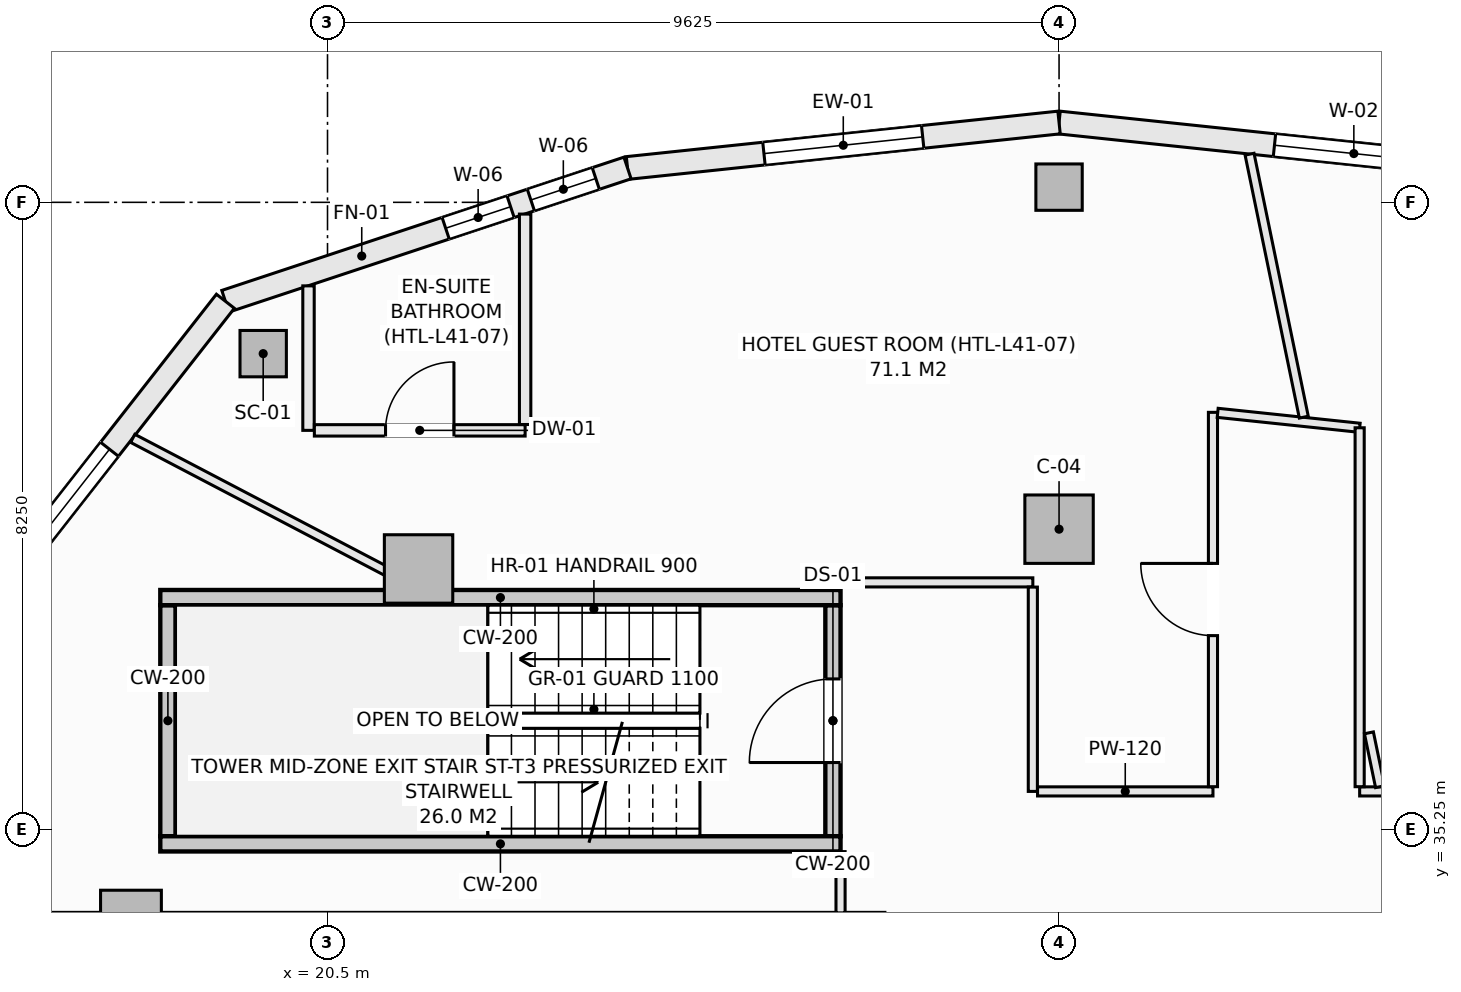
"""IFC4 building model, lengths in metres.
Left out: names, types, materials, properties, quantities, classifications, styles, units other than length and angle.
Written with IfcOpenShell. Run it as: python <this file> out.ifc"""

import sys

from ifc_helpers import new_model, si_unit, direction, frame, frame_2d, origin, origin_2d, place, context, subcontext, project, spatial, rectangle, hollow_rectangle, extrude, element, fill, save


model = new_model("IFC4")
c1 = context("Model", 3, precision=1e-05, world=origin(), true_north=direction((0.0, 1.0)))
c2 = subcontext(c1, "Body", "Model", "MODEL_VIEW")
j1 = project(units=[si_unit("LENGTHUNIT", "METRE"), si_unit("PLANEANGLEUNIT", "RADIAN")], contexts=[c1])
p1 = place(None, origin())
s1 = spatial("IfcSite", under=j1, at=p1, CompositionType="ELEMENT")
p2 = place(p1, origin())
s2 = spatial("IfcBuilding", under=s1, at=p2, CompositionType="ELEMENT")
p3 = place(p2, frame((0.0, 0.0, 159.7)))
s3 = spatial("IfcBuildingStorey", under=s2, at=p3, CompositionType="ELEMENT", Elevation=159.7)
for number, where, z_axis, x_axis in (
    (1, (30.125, 43.7, -0.27), (0.0, 0.0, 1.0), (1.0, 0.0, 0.0)),
    (2, (19.654, 41.51, -0.27), (0.0, 0.0, 1.0), (1.0, 0.0, 0.0)),
):
    element("IfcColumn", number, at=place(p3, frame(where, z_axis=z_axis, x_axis=x_axis)), inside=s3, PredefinedType="COLUMN", context=c2, shape_type="SweptSolid", body=[
        extrude(hollow_rectangle(XDim=0.61, YDim=0.61, WallThickness=0.025, at=origin_2d()), origin(), (0.0, 0.0, 1.0), 3.4),
    ])
for number, where, z_axis, x_axis in (
    (3, (30.125, 39.2, -0.27), (0.0, 0.0, 1.0), (1.0, 0.0, 0.0)),
    (4, (21.698, 38.677, -0.27), (0.0, 0.0, 1.0), (1.0, 0.0, 0.0)),
):
    element("IfcColumn", number, at=place(p3, frame(where, z_axis=z_axis, x_axis=x_axis)), inside=s3, PredefinedType="COLUMN", context=c2, shape_type="SweptSolid", body=[
        extrude(rectangle(XDim=0.9, YDim=0.9, at=origin_2d()), origin(), (0.0, 0.0, 1.0), 3.4),
    ])
p4 = place(p3, frame((17.914, 34.05, -0.27), z_axis=(0.0, 0.0, 1.0), x_axis=(1.0, 0.0, 0.0)))
e5 = element("IfcColumn", 5, at=p4, inside=s3, PredefinedType="PILASTER", context=c2, shape_type="SweptSolid", body=[
    extrude(rectangle(XDim=0.8, YDim=0.8, at=origin_2d()), origin(), (0.0, 0.0, 1.0), 3.4),
])
p5 = place(p3, frame((30.125, 44.55, 0.0), z_axis=(0.0, 0.0, 1.0), x_axis=(0.994496545245, -0.104769372887, 0.0)))
e6 = element("IfcWall", 6, at=p5, inside=s3, PredefinedType="SOLIDWALL", context=c2, shape_type="SweptSolid", body=[
    extrude(rectangle(XDim=5.709, YDim=0.3, at=frame_2d((2.854, 0.0))), origin(), (0.0, 0.0, 1.0), 2.653),
])
p6 = place(p5, frame((2.85, 0.0, 0.74)))
e7 = element("IfcOpeningElement", 7, at=p6, cuts=e6, PredefinedType="OPENING", context=c2, shape_type="SweptSolid", body=[
    extrude(rectangle(XDim=2.1, YDim=1.7, at=frame_2d((1.05, 0.85))), frame((0.0, 0.16, 0.0), z_axis=(0.0, -1.0, 0.0), x_axis=(1.0, 0.0, 0.0)), (0.0, 0.0, 1.0), 0.32),
])
p7 = place(p3, frame((24.447, 43.952, 0.0), z_axis=(0.0, 0.0, 1.0), x_axis=(0.994496545245, 0.104769372887, 0.0)))
e8 = element("IfcWall", 8, at=p7, inside=s3, PredefinedType="SOLIDWALL", context=c2, shape_type="SweptSolid", body=[
    extrude(rectangle(XDim=5.709, YDim=0.3, at=frame_2d((2.854, 0.0))), origin(), (0.0, 0.0, 1.0), 2.653),
])
p8 = place(p7, frame((1.805, 0.0, 0.74)))
e9 = element("IfcOpeningElement", 9, at=p8, cuts=e8, PredefinedType="OPENING", context=c2, shape_type="SweptSolid", body=[
    extrude(rectangle(XDim=2.1, YDim=1.7, at=frame_2d((1.05, 0.85))), frame((0.0, 0.16, 0.0), z_axis=(0.0, -1.0, 0.0), x_axis=(1.0, 0.0, 0.0)), (0.0, 0.0, 1.0), 0.32),
])
p9 = place(p3, frame((19.156, 42.199, 0.0), z_axis=(0.0, 0.0, 1.0), x_axis=(0.949246811547, 0.314532177636, 0.0)))
e10 = element("IfcWall", 10, at=p9, inside=s3, PredefinedType="SOLIDWALL", context=c2, shape_type="SweptSolid", body=[
    extrude(rectangle(XDim=5.574, YDim=0.3, at=frame_2d((2.787, 0.0))), origin(), (0.0, 0.0, 1.0), 2.653),
])
p10 = place(p9, frame((3.053, 0.0, 0.74)))
e11 = element("IfcOpeningElement", 11, at=p10, cuts=e10, PredefinedType="OPENING", context=c2, shape_type="SweptSolid", body=[
    extrude(rectangle(XDim=0.9, YDim=1.7, at=frame_2d((0.45, 0.85))), frame((0.0, 0.16, 0.0), z_axis=(0.0, -1.0, 0.0), x_axis=(1.0, 0.0, 0.0)), (0.0, 0.0, 1.0), 0.32),
])
p11 = place(p9, frame((4.234, 0.0, 0.74)))
e12 = element("IfcOpeningElement", 12, at=p11, cuts=e10, PredefinedType="OPENING", context=c2, shape_type="SweptSolid", body=[
    extrude(rectangle(XDim=0.9, YDim=1.7, at=frame_2d((0.45, 0.85))), frame((0.0, 0.16, 0.0), z_axis=(0.0, -1.0, 0.0), x_axis=(1.0, 0.0, 0.0)), (0.0, 0.0, 1.0), 0.32),
])
p12 = place(p3, frame((15.937, 38.086, 0.0), z_axis=(0.0, 0.0, 1.0), x_axis=(0.616429245738, 0.787410302828, 0.0)))
e13 = element("IfcWall", 13, at=p12, inside=s3, PredefinedType="SOLIDWALL", context=c2, shape_type="SweptSolid", body=[
    extrude(rectangle(XDim=5.223, YDim=0.3, at=frame_2d((2.612, 0.0))), origin(), (0.0, 0.0, 1.0), 2.653),
])
p13 = place(p12, frame((0.65, 0.0, 0.74)))
e14 = element("IfcOpeningElement", 14, at=p13, cuts=e13, PredefinedType="OPENING", context=c2, shape_type="SweptSolid", body=[
    extrude(rectangle(XDim=2.1, YDim=1.7, at=frame_2d((1.05, 0.85))), frame((0.0, 0.16, 0.0), z_axis=(0.0, -1.0, 0.0), x_axis=(1.0, 0.0, 0.0)), (0.0, 0.0, 1.0), 0.32),
])
p14 = place(p3, frame((27.15, 35.16, -0.27), z_axis=(0.0, 0.0, 1.0), x_axis=(0.0, 1.0, 0.0)))
e15 = element("IfcWall", 15, at=p14, inside=s3, PredefinedType="SHEAR", context=c2, shape_type="SweptSolid", body=[
    extrude(rectangle(XDim=3.04, YDim=0.2, at=frame_2d((1.52, 0.0))), origin(), (0.0, 0.0, 1.0), 3.4),
])
p15 = place(p14, frame((0.97, 0.0, 0.27)))
e16 = element("IfcOpeningElement", 16, at=p15, cuts=e15, PredefinedType="OPENING", context=c2, shape_type="SweptSolid", body=[
    extrude(rectangle(XDim=1.1, YDim=2.15, at=frame_2d((0.55, 1.075))), frame((0.0, 0.11, 0.0), z_axis=(0.0, -1.0, 0.0), x_axis=(1.0, 0.0, 0.0)), (0.0, 0.0, 1.0), 0.22),
])
p16 = place(p3, frame((18.4, 35.16, -0.27), z_axis=(0.0, 0.0, 1.0), x_axis=(0.0, 1.0, 0.0)))
e17 = element("IfcWall", 17, at=p16, inside=s3, PredefinedType="SHEAR", context=c2, shape_type="SweptSolid", body=[
    extrude(rectangle(XDim=3.04, YDim=0.2, at=frame_2d((1.52, 0.0))), origin(), (0.0, 0.0, 1.0), 3.4),
])
for number, where, z_axis, x_axis in (
    (18, (18.3, 38.3, -0.27), (0.0, 0.0, 1.0), (1.0, 0.0, 0.0)),
    (19, (18.3, 35.06, -0.27), (0.0, 0.0, 1.0), (1.0, 0.0, 0.0)),
):
    element("IfcWall", number, at=place(p3, frame(where, z_axis=z_axis, x_axis=x_axis)), inside=s3, PredefinedType="SHEAR", context=c2, shape_type="SweptSolid", body=[
        extrude(rectangle(XDim=8.95, YDim=0.2, at=frame_2d((4.475, 0.0))), origin(), (0.0, 0.0, 1.0), 3.4),
    ])
p17 = place(p3, frame((27.25, 34.152, 0.0), z_axis=(0.0, 0.0, 1.0), x_axis=(0.0, 1.0, 0.0)))
e20 = element("IfcWall", 20, at=p17, inside=s3, PredefinedType="PARTITIONING", context=c2, shape_type="SweptSolid", body=[
    extrude(rectangle(XDim=0.806, YDim=0.12, at=frame_2d((0.403, 0.0))), origin(), (0.0, 0.0, 1.0), 3.13),
])
p18 = place(p3, frame((27.25, 38.5, 0.0), z_axis=(0.0, 0.0, 1.0), x_axis=(1.0, 0.0, 0.0)))
e21 = element("IfcWall", 21, at=p18, inside=s3, PredefinedType="PARTITIONING", context=c2, shape_type="SweptSolid", body=[
    extrude(rectangle(XDim=2.53, YDim=0.12, at=frame_2d((1.265, 0.0))), origin(), (0.0, 0.0, 1.0), 3.13),
])
p19 = place(p3, frame((29.78, 35.75, 0.0), z_axis=(0.0, 0.0, 1.0), x_axis=(0.0, 1.0, 0.0)))
e22 = element("IfcWall", 22, at=p19, inside=s3, PredefinedType="PARTITIONING", context=c2, shape_type="SweptSolid", body=[
    extrude(rectangle(XDim=2.688, YDim=0.12, at=frame_2d((1.344, 0.0))), origin(), (0.0, 0.0, 1.0), 3.13),
])
p20 = place(p3, frame((29.842, 35.75, 0.0), z_axis=(0.0, 0.0, 1.0), x_axis=(1.0, 0.0, 0.0)))
e23 = element("IfcWall", 23, at=p20, inside=s3, PredefinedType="PARTITIONING", context=c2, shape_type="SweptSolid", body=[
    extrude(rectangle(XDim=2.308, YDim=0.12, at=frame_2d((1.154, 0.0))), origin(), (0.0, 0.0, 1.0), 3.13),
])
p21 = place(p3, frame((34.08, 35.75, 0.0), z_axis=(0.0, 0.0, 1.0), x_axis=(1.0, 0.0, 0.0)))
e24 = element("IfcWall", 24, at=p21, inside=s3, PredefinedType="PARTITIONING", context=c2, shape_type="SweptSolid", body=[
    extrude(rectangle(XDim=4.878, YDim=0.12, at=frame_2d((2.439, 0.0))), origin(), (0.0, 0.0, 1.0), 2.505),
])
p22 = place(p21, frame((1.544, 0.0, 0.0)))
e25 = element("IfcOpeningElement", 25, at=p22, cuts=e24, PredefinedType="OPENING", context=c2, shape_type="SweptSolid", body=[
    extrude(rectangle(XDim=0.95, YDim=2.1, at=frame_2d((0.475, 1.05))), frame((0.0, 0.07, 0.0), z_axis=(0.0, -1.0, 0.0), x_axis=(1.0, 0.0, 0.0)), (0.0, 0.0, 1.0), 0.14),
])
p23 = place(p3, frame((32.15, 35.812, 0.0), z_axis=(0.0, 0.0, 1.0), x_axis=(0.0, 1.0, 0.0)))
e26 = element("IfcWall", 26, at=p23, inside=s3, PredefinedType="PARTITIONING", context=c2, shape_type="SweptSolid", body=[
    extrude(rectangle(XDim=4.925, YDim=0.12, at=frame_2d((2.462, 0.0))), origin(), (0.0, 0.0, 1.0), 3.13),
])
p24 = place(p23, frame((1.988, 0.0, 0.0)))
e27 = element("IfcOpeningElement", 27, at=p24, cuts=e26, PredefinedType="OPENING", context=c2, shape_type="SweptSolid", body=[
    extrude(rectangle(XDim=0.95, YDim=2.1, at=frame_2d((0.475, 1.05))), frame((0.0, 0.07, 0.0), z_axis=(0.0, -1.0, 0.0), x_axis=(1.0, 0.0, 0.0)), (0.0, 0.0, 1.0), 0.14),
])
p25 = place(p3, frame((32.212, 40.73, 0.0), z_axis=(0.0, 0.0, 1.0), x_axis=(0.994511860417, -0.104623895405, 0.0)))
e28 = element("IfcWall", 28, at=p25, inside=s3, PredefinedType="PARTITIONING", context=c2, shape_type="SweptSolid", body=[
    extrude(rectangle(XDim=1.878, YDim=0.12, at=frame_2d((0.939, 0.0))), origin(), (0.0, 0.0, 1.0), 3.13),
])
p26 = place(p3, frame((34.08, 35.812, 0.0), z_axis=(0.0, 0.0, 1.0), x_axis=(0.0, 1.0, 0.0)))
e29 = element("IfcWall", 29, at=p26, inside=s3, PredefinedType="PARTITIONING", context=c2, shape_type="SweptSolid", body=[
    extrude(rectangle(XDim=4.722, YDim=0.12, at=frame_2d((2.361, 0.0))), origin(), (0.0, 0.0, 1.0), 2.812),
])
p27 = place(p3, frame((17.937, 40.395, 0.0), z_axis=(0.0, 0.0, 1.0), x_axis=(0.885906043835, -0.463864723273, 0.0)))
e30 = element("IfcWall", 30, at=p27, inside=s3, PredefinedType="PARTITIONING", context=c2, shape_type="SweptSolid", body=[
    extrude(rectangle(XDim=4.296, YDim=0.12, at=frame_2d((2.148, 0.0))), origin(), (0.0, 0.0, 1.0), 3.13),
])
p28 = place(p3, frame((32.631, 44.133, 0.0), z_axis=(0.0, 0.0, 1.0), x_axis=(0.202079954577, -0.979369027465, 0.0)))
e31 = element("IfcWall", 31, at=p28, inside=s3, PredefinedType="PARTITIONING", context=c2, shape_type="SweptSolid", body=[
    extrude(rectangle(XDim=3.533, YDim=0.12, at=frame_2d((1.766, 0.0))), origin(), (0.0, 0.0, 1.0), 3.13),
])
p29 = place(p3, frame((34.202, 36.521, 0.0), z_axis=(0.0, 0.0, 1.0), x_axis=(0.202081256143, -0.979368758903, 0.0)))
e32 = element("IfcWall", 32, at=p29, inside=s3, PredefinedType="PARTITIONING", context=c2, shape_type="SweptSolid", body=[
    extrude(rectangle(XDim=0.724, YDim=0.12, at=frame_2d((0.362, 0.0))), origin(), (0.0, 0.0, 1.0), 3.13),
])
p30 = place(p3, frame((20.25, 40.5, 0.0), z_axis=(0.0, 0.0, 1.0), x_axis=(0.0, 1.0, 0.0)))
e33 = element("IfcWall", 33, at=p30, inside=s3, PredefinedType="PARTITIONING", context=c2, shape_type="SweptSolid", body=[
    extrude(rectangle(XDim=1.901, YDim=0.15, at=frame_2d((0.95, 0.0))), origin(), (0.0, 0.0, 1.0), 2.505),
])
p31 = place(p3, frame((20.327, 40.5, 0.0), z_axis=(0.0, 0.0, 1.0), x_axis=(1.0, 0.0, 0.0)))
e34 = element("IfcWall", 34, at=p31, inside=s3, PredefinedType="PARTITIONING", context=c2, shape_type="SweptSolid", body=[
    extrude(rectangle(XDim=2.773, YDim=0.15, at=frame_2d((1.387, 0.0))), origin(), (0.0, 0.0, 1.0), 3.13),
])
p32 = place(p31, frame((0.937, 0.0, 0.0)))
e35 = element("IfcOpeningElement", 35, at=p32, cuts=e34, PredefinedType="OPENING", context=c2, shape_type="SweptSolid", body=[
    extrude(rectangle(XDim=0.9, YDim=2.1, at=frame_2d((0.45, 1.05))), frame((0.0, 0.085, 0.0), z_axis=(0.0, -1.0, 0.0), x_axis=(1.0, 0.0, 0.0)), (0.0, 0.0, 1.0), 0.17),
])
p33 = place(p3, frame((23.1, 40.577, 0.0), z_axis=(0.0, 0.0, 1.0), x_axis=(0.0, 1.0, 0.0)))
e36 = element("IfcWall", 36, at=p33, inside=s3, PredefinedType="PARTITIONING", context=c2, shape_type="SweptSolid", body=[
    extrude(rectangle(XDim=2.769, YDim=0.15, at=frame_2d((1.384, 0.0))), origin(), (0.0, 0.0, 1.0), 3.13),
])
p34 = place(p6, origin())
e37 = element("IfcWindow", 37, at=p34, inside=s3, PartitioningType="SINGLE_PANEL", PredefinedType="WINDOW", context=c2, shape_type="SweptSolid", body=[
    extrude(rectangle(XDim=2.1, YDim=1.7, at=frame_2d((1.05, 0.85))), frame((0.0, 0.03, 0.0), z_axis=(0.0, -1.0, 0.0), x_axis=(1.0, 0.0, 0.0)), (0.0, 0.0, 1.0), 0.06),
])
fill(e7, e37)
p35 = place(p8, origin())
e38 = element("IfcWindow", 38, at=p35, inside=s3, PartitioningType="SINGLE_PANEL", PredefinedType="WINDOW", context=c2, shape_type="SweptSolid", body=[
    extrude(rectangle(XDim=2.1, YDim=1.7, at=frame_2d((1.05, 0.85))), frame((0.0, 0.03, 0.0), z_axis=(0.0, -1.0, 0.0), x_axis=(1.0, 0.0, 0.0)), (0.0, 0.0, 1.0), 0.06),
])
fill(e9, e38)
p36 = place(p10, origin())
e39 = element("IfcWindow", 39, at=p36, inside=s3, PartitioningType="SINGLE_PANEL", PredefinedType="WINDOW", context=c2, shape_type="SweptSolid", body=[
    extrude(rectangle(XDim=0.9, YDim=1.7, at=frame_2d((0.45, 0.85))), frame((0.0, 0.03, 0.0), z_axis=(0.0, -1.0, 0.0), x_axis=(1.0, 0.0, 0.0)), (0.0, 0.0, 1.0), 0.06),
])
fill(e11, e39)
p37 = place(p13, origin())
e40 = element("IfcWindow", 40, at=p37, inside=s3, PartitioningType="SINGLE_PANEL", PredefinedType="WINDOW", context=c2, shape_type="SweptSolid", body=[
    extrude(rectangle(XDim=2.1, YDim=1.7, at=frame_2d((1.05, 0.85))), frame((0.0, 0.03, 0.0), z_axis=(0.0, -1.0, 0.0), x_axis=(1.0, 0.0, 0.0)), (0.0, 0.0, 1.0), 0.06),
])
fill(e14, e40)
p38 = place(p15, origin())
e41 = element("IfcDoor", 41, at=p38, inside=s3, OperationType="SINGLE_SWING_LEFT", PredefinedType="DOOR", context=c2, shape_type="SweptSolid", body=[
    extrude(rectangle(XDim=1.1, YDim=2.15, at=frame_2d((0.55, 1.075))), frame((0.0, 0.025, 0.0), z_axis=(0.0, -1.0, 0.0), x_axis=(1.0, 0.0, 0.0)), (0.0, 0.0, 1.0), 0.05),
])
fill(e16, e41)
p39 = place(p24, origin())
e42 = element("IfcDoor", 42, at=p39, inside=s3, OperationType="SINGLE_SWING_RIGHT", PredefinedType="DOOR", context=c2, shape_type="SweptSolid", body=[
    extrude(rectangle(XDim=0.95, YDim=2.1, at=frame_2d((0.475, 1.05))), frame((0.0, 0.025, 0.0), z_axis=(0.0, -1.0, 0.0), x_axis=(1.0, 0.0, 0.0)), (0.0, 0.0, 1.0), 0.05),
])
fill(e27, e42)
p40 = place(p32, origin())
e43 = element("IfcDoor", 43, at=p40, inside=s3, OperationType="SINGLE_SWING_RIGHT", PredefinedType="DOOR", context=c2, shape_type="SweptSolid", body=[
    extrude(rectangle(XDim=0.9, YDim=2.1, at=frame_2d((0.45, 1.05))), frame((0.0, 0.025, 0.0), z_axis=(0.0, -1.0, 0.0), x_axis=(1.0, 0.0, 0.0)), (0.0, 0.0, 1.0), 0.05),
])
fill(e35, e43)
p41 = place(p11, origin())
e44 = element("IfcWindow", 44, at=p41, inside=s3, PartitioningType="SINGLE_PANEL", PredefinedType="WINDOW", context=c2, shape_type="SweptSolid", body=[
    extrude(rectangle(XDim=0.9, YDim=1.7, at=frame_2d((0.45, 0.85))), frame((0.0, 0.03, 0.0), z_axis=(0.0, -1.0, 0.0), x_axis=(1.0, 0.0, 0.0)), (0.0, 0.0, 1.0), 0.06),
])
fill(e12, e44)
save(model, sys.argv[1])
